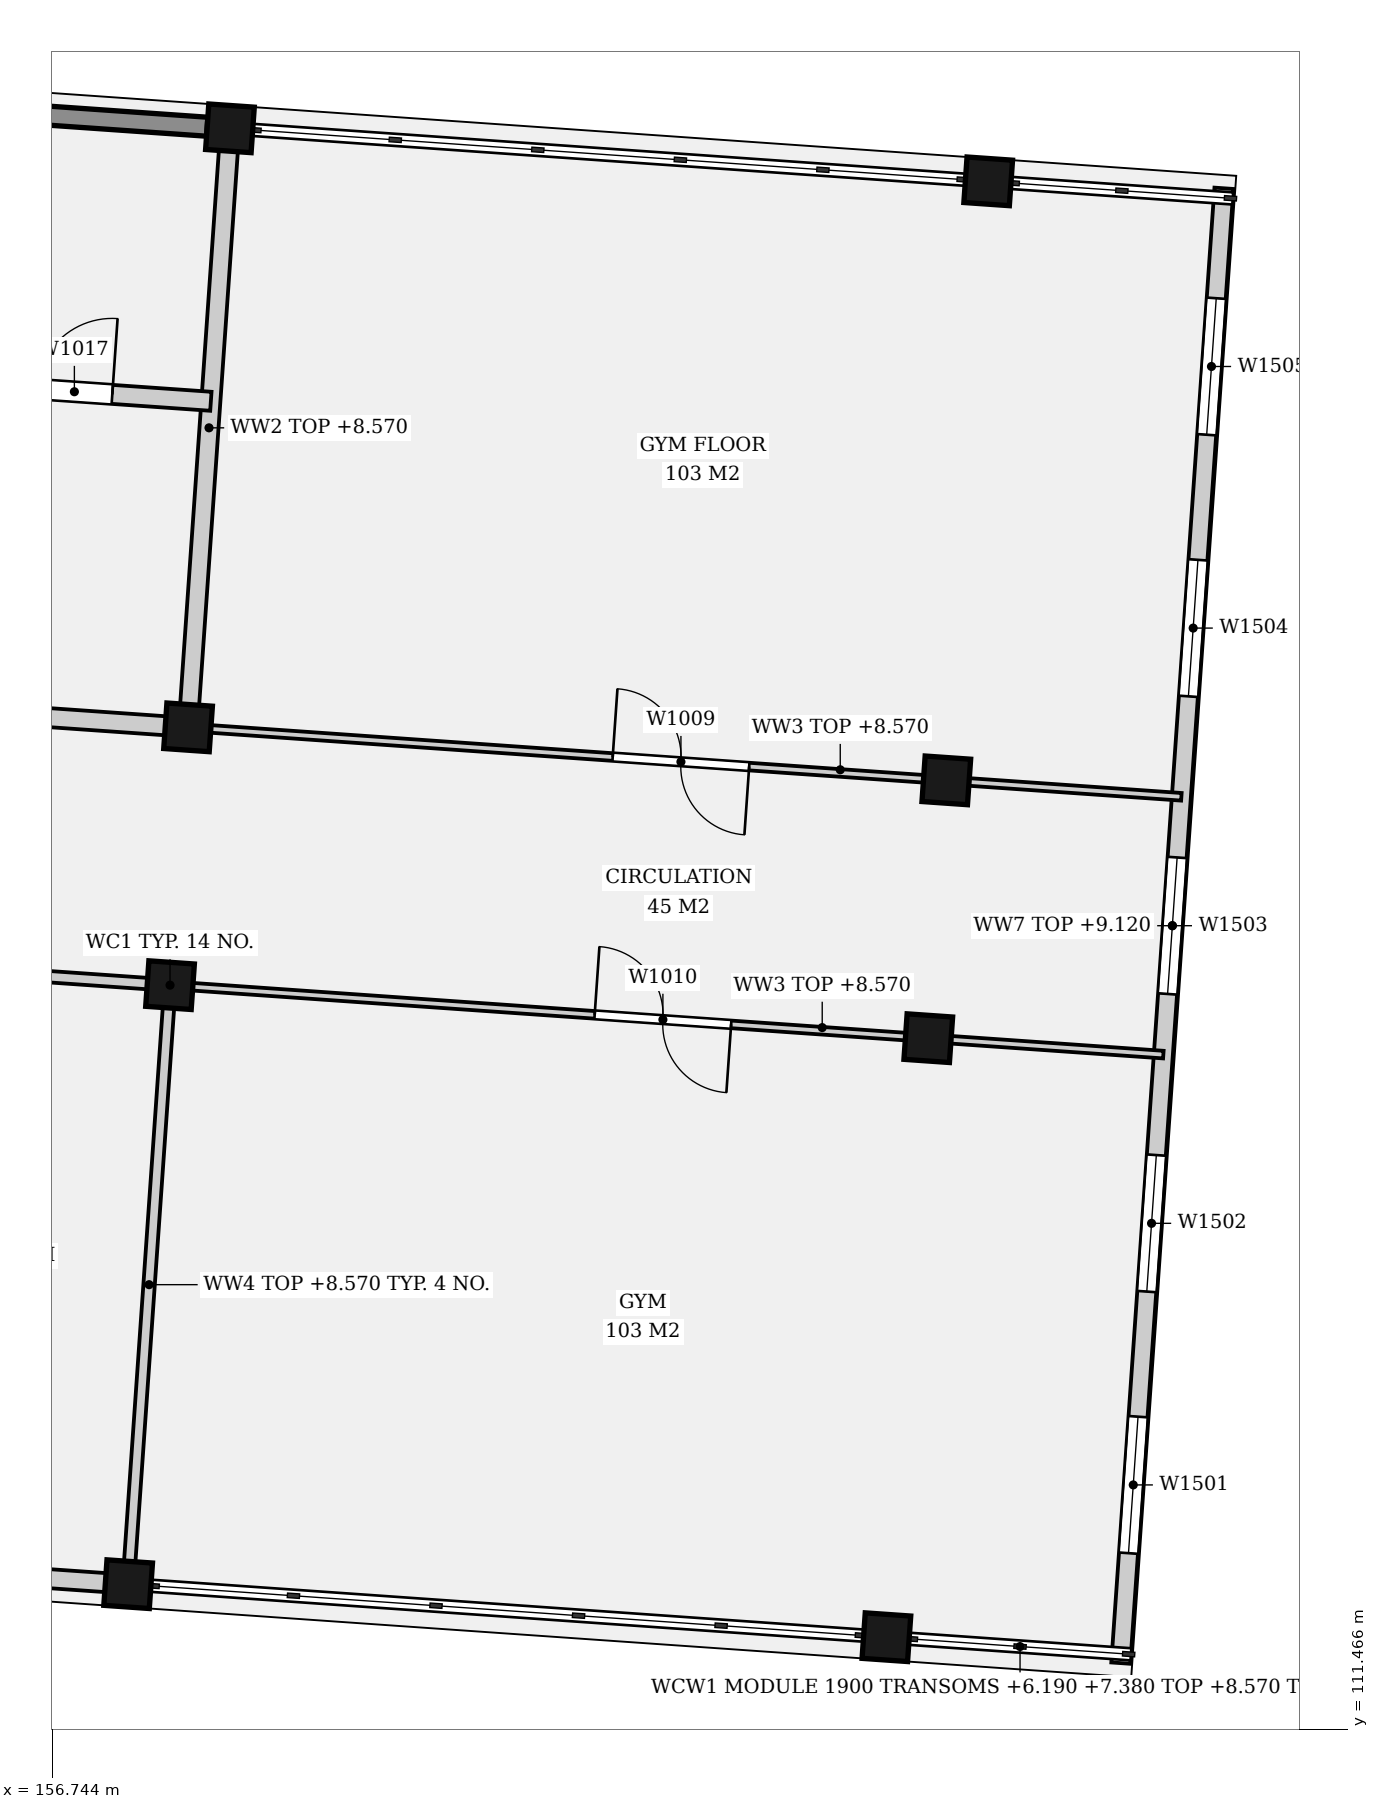
"""IFC4 building model, lengths in metres.
Left out: names, types, materials, properties, quantities, classifications, styles, units other than length and angle.
Written with IfcOpenShell. Run it as: python <this file> out.ifc"""

import sys

from ifc_helpers import new_model, si_unit, direction, frame, frame_2d, origin, origin_2d, place, context, subcontext, project, spatial, rectangle, extrude, element, fill, save


model = new_model("IFC4")
c1 = context("Model", 3, precision=1e-05, world=origin(), true_north=direction((0.0, 1.0)))
c2 = subcontext(c1, "Body", "Model", "MODEL_VIEW")
j1 = project(units=[si_unit("LENGTHUNIT", "METRE"), si_unit("PLANEANGLEUNIT", "RADIAN")], contexts=[c1])
p1 = place(None, origin())
s1 = spatial("IfcSite", under=j1, at=p1, CompositionType="ELEMENT")
p2 = place(p1, origin())
s2 = spatial("IfcBuilding", under=s1, at=p2, CompositionType="ELEMENT")
p3 = place(p2, frame((0.0, 0.0, 5.0)))
s3 = spatial("IfcBuildingStorey", under=s2, at=p3, CompositionType="ELEMENT", Elevation=5.0)
for number, where, z_axis, x_axis in (
    (1, (157.741, 113.377, 0.0), (0.0, 0.0, 1.0), (0.998, -0.07, 0.0)),
    (2, (158.292, 121.258, 0.0), (0.0, 0.0, 1.0), (0.998, -0.07, 0.0)),
    (3, (158.53, 124.65, 0.0), (0.0, 0.0, 1.0), (0.998, -0.07, 0.0)),
    (4, (159.081, 132.531, 0.0), (0.0, 0.0, 1.0), (0.998, -0.07, 0.0)),
    (5, (167.717, 112.68, 0.0), (0.0, 0.0, 1.0), (0.998, -0.07, 0.0)),
    (6, (168.268, 120.561, 0.0), (0.0, 0.0, 1.0), (0.998, -0.07, 0.0)),
    (7, (168.505, 123.952, 0.0), (0.0, 0.0, 1.0), (0.998, -0.07, 0.0)),
    (8, (169.056, 131.833, 0.0), (0.0, 0.0, 1.0), (0.998, -0.07, 0.0)),
):
    element("IfcColumn", number, at=place(p3, frame(where, z_axis=z_axis, x_axis=x_axis)), inside=s3, PredefinedType="COLUMN", context=c2, shape_type="SweptSolid", body=[
        extrude(rectangle(XDim=0.6, YDim=0.6, at=origin_2d()), origin(), (0.0, 0.0, 1.0), 4.4),
    ])
p4 = place(p3, frame((148.065, 114.054, 0.0), z_axis=(0.0, 0.0, 1.0), x_axis=(0.997563596579, -0.069762961373, 0.0)))
e9 = element("IfcWall", 9, at=p4, inside=s3, PredefinedType="SOLIDWALL", context=c2, shape_type="SweptSolid", body=[
    extrude(rectangle(XDim=9.4, YDim=0.25, at=frame_2d((4.7, 0.0))), origin(), (0.0, 0.0, 1.0), 3.57),
])
p5 = place(p3, frame((149.404, 133.207, 0.0), z_axis=(0.0, 0.0, 1.0), x_axis=(0.997565530081, -0.069735308086, 0.0)))
e10 = element("IfcWall", 10, at=p5, inside=s3, PredefinedType="SOLIDWALL", context=c2, shape_type="SweptSolid", body=[
    extrude(rectangle(XDim=9.4, YDim=0.25, at=frame_2d((4.7, 0.0))), origin(), (0.0, 0.0, 1.0), 3.57),
])
p6 = place(p3, frame((170.801, 112.339, 0.0), z_axis=(0.0, 0.0, 1.0), x_axis=(0.069765298421, 0.997563433139, 0.0)))
e11 = element("IfcWall", 11, at=p6, inside=s3, PredefinedType="SOLIDWALL", context=c2, shape_type="SweptSolid", body=[
    extrude(rectangle(XDim=19.45, YDim=0.25, at=frame_2d((9.725, 0.0))), origin(), (0.0, 0.0, 1.0), 4.12),
])
p7 = place(p6, frame((1.45, 0.0, 0.9)))
e12 = element("IfcOpeningElement", 12, at=p7, cuts=e11, PredefinedType="OPENING", context=c2, shape_type="SweptSolid", body=[
    extrude(rectangle(XDim=1.8, YDim=2.4, at=frame_2d((0.9, 1.2))), frame((0.0, 0.135, 0.0), z_axis=(0.0, -1.0, 0.0), x_axis=(1.0, 0.0, 0.0)), (0.0, 0.0, 1.0), 0.27),
])
p8 = place(p6, frame((4.9, 0.0, 0.9)))
e13 = element("IfcOpeningElement", 13, at=p8, cuts=e11, PredefinedType="OPENING", context=c2, shape_type="SweptSolid", body=[
    extrude(rectangle(XDim=1.8, YDim=2.4, at=frame_2d((0.9, 1.2))), frame((0.0, 0.135, 0.0), z_axis=(0.0, -1.0, 0.0), x_axis=(1.0, 0.0, 0.0)), (0.0, 0.0, 1.0), 0.27),
])
p9 = place(p6, frame((8.825, 0.0, 0.9)))
e14 = element("IfcOpeningElement", 14, at=p9, cuts=e11, PredefinedType="OPENING", context=c2, shape_type="SweptSolid", body=[
    extrude(rectangle(XDim=1.8, YDim=2.4, at=frame_2d((0.9, 1.2))), frame((0.0, 0.135, 0.0), z_axis=(0.0, -1.0, 0.0), x_axis=(1.0, 0.0, 0.0)), (0.0, 0.0, 1.0), 0.27),
])
p10 = place(p6, frame((12.75, 0.0, 0.9)))
e15 = element("IfcOpeningElement", 15, at=p10, cuts=e11, PredefinedType="OPENING", context=c2, shape_type="SweptSolid", body=[
    extrude(rectangle(XDim=1.8, YDim=2.4, at=frame_2d((0.9, 1.2))), frame((0.0, 0.135, 0.0), z_axis=(0.0, -1.0, 0.0), x_axis=(1.0, 0.0, 0.0)), (0.0, 0.0, 1.0), 0.27),
])
p11 = place(p6, frame((16.2, 0.0, 0.9)))
e16 = element("IfcOpeningElement", 16, at=p11, cuts=e11, PredefinedType="OPENING", context=c2, shape_type="SweptSolid", body=[
    extrude(rectangle(XDim=1.8, YDim=2.4, at=frame_2d((0.9, 1.2))), frame((0.0, 0.135, 0.0), z_axis=(0.0, -1.0, 0.0), x_axis=(1.0, 0.0, 0.0)), (0.0, 0.0, 1.0), 0.27),
])
p12 = place(p3, frame((157.741, 113.377, 0.0), z_axis=(0.0, 0.0, 1.0), x_axis=(0.0697491702, 0.997564560947, 0.0)))
e17 = element("IfcWall", 17, at=p12, inside=s3, PredefinedType="PARTITIONING", context=c2, shape_type="SweptSolid", body=[
    extrude(rectangle(XDim=7.9, YDim=0.15, at=frame_2d((3.95, 0.0))), origin(), (0.0, 0.0, 1.0), 3.57),
])
p13 = place(p3, frame((158.53, 124.65, 0.0), z_axis=(0.0, 0.0, 1.0), x_axis=(0.0697491702, 0.997564560947, 0.0)))
e18 = element("IfcWall", 18, at=p13, inside=s3, PredefinedType="SOLIDWALL", context=c2, shape_type="SweptSolid", body=[
    extrude(rectangle(XDim=7.9, YDim=0.25, at=frame_2d((3.95, 0.0))), origin(), (0.0, 0.0, 1.0), 3.57),
])
p14 = place(p3, frame((148.317, 121.956, 0.0), z_axis=(0.0, 0.0, 1.0), x_axis=(0.997564406228, -0.069751382981, 0.0)))
e19 = element("IfcWall", 19, at=p14, inside=s3, PredefinedType="PARTITIONING", context=c2, shape_type="SweptSolid", body=[
    extrude(rectangle(XDim=10.0, YDim=0.15, at=frame_2d((5.0, 0.0))), origin(), (0.0, 0.0, 1.0), 3.57),
])
p15 = place(p14, frame((2.0, 0.0, 0.0)))
e20 = element("IfcOpeningElement", 20, at=p15, cuts=e19, PredefinedType="OPENING", context=c2, shape_type="SweptSolid", body=[
    extrude(rectangle(XDim=1.0, YDim=2.1, at=frame_2d((0.5, 1.05))), frame((0.0, 0.085, 0.0), z_axis=(0.0, -1.0, 0.0), x_axis=(1.0, 0.0, 0.0)), (0.0, 0.0, 1.0), 0.17),
])
p16 = place(p14, frame((7.0, 0.0, 0.0)))
e21 = element("IfcOpeningElement", 21, at=p16, cuts=e19, PredefinedType="OPENING", context=c2, shape_type="SweptSolid", body=[
    extrude(rectangle(XDim=1.0, YDim=2.1, at=frame_2d((0.5, 1.05))), frame((0.0, 0.085, 0.0), z_axis=(0.0, -1.0, 0.0), x_axis=(1.0, 0.0, 0.0)), (0.0, 0.0, 1.0), 0.17),
])
p17 = place(p3, frame((158.292, 121.258, 0.0), z_axis=(0.0, 0.0, 1.0), x_axis=(0.997564014548, -0.069756984446, 0.0)))
e22 = element("IfcWall", 22, at=p17, inside=s3, PredefinedType="PARTITIONING", context=c2, shape_type="SweptSolid", body=[
    extrude(rectangle(XDim=13.1, YDim=0.1, at=frame_2d((6.55, 0.0))), origin(), (0.0, 0.0, 1.0), 3.57),
])
p18 = place(p17, frame((5.6, 0.0, 0.0)))
e23 = element("IfcOpeningElement", 23, at=p18, cuts=e22, PredefinedType="OPENING", context=c2, shape_type="SweptSolid", body=[
    extrude(rectangle(XDim=1.8, YDim=2.1, at=frame_2d((0.9, 1.05))), frame((0.0, 0.06, 0.0), z_axis=(0.0, -1.0, 0.0), x_axis=(1.0, 0.0, 0.0)), (0.0, 0.0, 1.0), 0.12),
])
p19 = place(p3, frame((152.544, 125.068, 0.0), z_axis=(0.0, 0.0, 1.0), x_axis=(0.997562338811, -0.069780944286, 0.0)))
e24 = element("IfcWall", 24, at=p19, inside=s3, PredefinedType="SOLIDWALL", context=c2, shape_type="SweptSolid", body=[
    extrude(rectangle(XDim=6.0, YDim=0.25, at=frame_2d((3.0, 0.0))), origin(), (0.0, 0.0, 1.0), 3.57),
])
p20 = place(p19, frame((2.7, 0.0, 0.0)))
e25 = element("IfcOpeningElement", 25, at=p20, cuts=e24, PredefinedType="OPENING", context=c2, shape_type="SweptSolid", body=[
    extrude(rectangle(XDim=1.0, YDim=2.1, at=frame_2d((0.5, 1.05))), frame((0.0, 0.135, 0.0), z_axis=(0.0, -1.0, 0.0), x_axis=(1.0, 0.0, 0.0)), (0.0, 0.0, 1.0), 0.27),
])
p21 = place(p3, frame((158.53, 124.65, 0.0), z_axis=(0.0, 0.0, 1.0), x_axis=(0.997564014548, -0.069756984446, 0.0)))
e26 = element("IfcWall", 26, at=p21, inside=s3, PredefinedType="PARTITIONING", context=c2, shape_type="SweptSolid", body=[
    extrude(rectangle(XDim=13.1, YDim=0.1, at=frame_2d((6.55, 0.0))), origin(), (0.0, 0.0, 1.0), 3.57),
])
p22 = place(p21, frame((5.6, 0.0, 0.0)))
e27 = element("IfcOpeningElement", 27, at=p22, cuts=e26, PredefinedType="OPENING", context=c2, shape_type="SweptSolid", body=[
    extrude(rectangle(XDim=1.8, YDim=2.1, at=frame_2d((0.9, 1.05))), frame((0.0, 0.06, 0.0), z_axis=(0.0, -1.0, 0.0), x_axis=(1.0, 0.0, 0.0)), (0.0, 0.0, 1.0), 0.12),
])
p23 = place(p3, frame((152.844, 129.358, 0.0), z_axis=(0.0, 0.0, 1.0), x_axis=(0.997562140671, -0.069783776768, 0.0)))
e28 = element("IfcWall", 28, at=p23, inside=s3, PredefinedType="SOLIDWALL", context=c2, shape_type="SweptSolid", body=[
    extrude(rectangle(XDim=6.0, YDim=0.25, at=frame_2d((3.0, 0.0))), origin(), (0.0, 0.0, 1.0), 3.57),
])
p24 = place(p23, frame((3.7, 0.0, 0.0)))
e29 = element("IfcOpeningElement", 29, at=p24, cuts=e28, PredefinedType="OPENING", context=c2, shape_type="SweptSolid", body=[
    extrude(rectangle(XDim=1.0, YDim=2.1, at=frame_2d((0.5, 1.05))), frame((0.0, 0.135, 0.0), z_axis=(0.0, -1.0, 0.0), x_axis=(1.0, 0.0, 0.0)), (0.0, 0.0, 1.0), 0.27),
])
p25 = place(p23, frame((0.65, 0.0, 0.0)))
e30 = element("IfcOpeningElement", 30, at=p25, cuts=e28, PredefinedType="OPENING", context=c2, shape_type="SweptSolid", body=[
    extrude(rectangle(XDim=1.1, YDim=2.1, at=frame_2d((0.55, 1.05))), frame((0.0, 0.135, 0.0), z_axis=(0.0, -1.0, 0.0), x_axis=(1.0, 0.0, 0.0)), (0.0, 0.0, 1.0), 0.27),
])
p26 = place(p7, origin())
e31 = element("IfcWindow", 31, at=p26, inside=s3, PartitioningType="SINGLE_PANEL", PredefinedType="WINDOW", context=c2, shape_type="SweptSolid", body=[
    extrude(rectangle(XDim=1.8, YDim=2.4, at=frame_2d((0.9, 1.2))), frame((0.0, 0.03, 0.0), z_axis=(0.0, -1.0, 0.0), x_axis=(1.0, 0.0, 0.0)), (0.0, 0.0, 1.0), 0.06),
])
fill(e12, e31)
p27 = place(p8, origin())
e32 = element("IfcWindow", 32, at=p27, inside=s3, PartitioningType="SINGLE_PANEL", PredefinedType="WINDOW", context=c2, shape_type="SweptSolid", body=[
    extrude(rectangle(XDim=1.8, YDim=2.4, at=frame_2d((0.9, 1.2))), frame((0.0, 0.03, 0.0), z_axis=(0.0, -1.0, 0.0), x_axis=(1.0, 0.0, 0.0)), (0.0, 0.0, 1.0), 0.06),
])
fill(e13, e32)
p28 = place(p9, origin())
e33 = element("IfcWindow", 33, at=p28, inside=s3, PartitioningType="SINGLE_PANEL", PredefinedType="WINDOW", context=c2, shape_type="SweptSolid", body=[
    extrude(rectangle(XDim=1.8, YDim=2.4, at=frame_2d((0.9, 1.2))), frame((0.0, 0.03, 0.0), z_axis=(0.0, -1.0, 0.0), x_axis=(1.0, 0.0, 0.0)), (0.0, 0.0, 1.0), 0.06),
])
fill(e14, e33)
p29 = place(p10, origin())
e34 = element("IfcWindow", 34, at=p29, inside=s3, PartitioningType="SINGLE_PANEL", PredefinedType="WINDOW", context=c2, shape_type="SweptSolid", body=[
    extrude(rectangle(XDim=1.8, YDim=2.4, at=frame_2d((0.9, 1.2))), frame((0.0, 0.03, 0.0), z_axis=(0.0, -1.0, 0.0), x_axis=(1.0, 0.0, 0.0)), (0.0, 0.0, 1.0), 0.06),
])
fill(e15, e34)
p30 = place(p11, origin())
e35 = element("IfcWindow", 35, at=p30, inside=s3, PartitioningType="SINGLE_PANEL", PredefinedType="WINDOW", context=c2, shape_type="SweptSolid", body=[
    extrude(rectangle(XDim=1.8, YDim=2.4, at=frame_2d((0.9, 1.2))), frame((0.0, 0.03, 0.0), z_axis=(0.0, -1.0, 0.0), x_axis=(1.0, 0.0, 0.0)), (0.0, 0.0, 1.0), 0.06),
])
fill(e16, e35)
p31 = place(p22, origin())
e36 = element("IfcDoor", 36, at=p31, inside=s3, OperationType="DOUBLE_DOOR_SINGLE_SWING", PredefinedType="DOOR", context=c2, shape_type="SweptSolid", body=[
    extrude(rectangle(XDim=1.8, YDim=2.1, at=frame_2d((0.9, 1.05))), frame((0.0, 0.025, 0.0), z_axis=(0.0, -1.0, 0.0), x_axis=(1.0, 0.0, 0.0)), (0.0, 0.0, 1.0), 0.05),
])
fill(e27, e36)
p32 = place(p18, origin())
e37 = element("IfcDoor", 37, at=p32, inside=s3, OperationType="DOUBLE_DOOR_SINGLE_SWING", PredefinedType="DOOR", context=c2, shape_type="SweptSolid", body=[
    extrude(rectangle(XDim=1.8, YDim=2.1, at=frame_2d((0.9, 1.05))), frame((0.0, 0.025, 0.0), z_axis=(0.0, -1.0, 0.0), x_axis=(1.0, 0.0, 0.0)), (0.0, 0.0, 1.0), 0.05),
])
fill(e23, e37)
p33 = place(p24, origin())
e38 = element("IfcDoor", 38, at=p33, inside=s3, OperationType="SINGLE_SWING_RIGHT", PredefinedType="DOOR", context=c2, shape_type="SweptSolid", body=[
    extrude(rectangle(XDim=1.0, YDim=2.1, at=frame_2d((0.5, 1.05))), frame((0.0, 0.025, 0.0), z_axis=(0.0, -1.0, 0.0), x_axis=(1.0, 0.0, 0.0)), (0.0, 0.0, 1.0), 0.05),
])
fill(e29, e38)
save(model, sys.argv[1])
